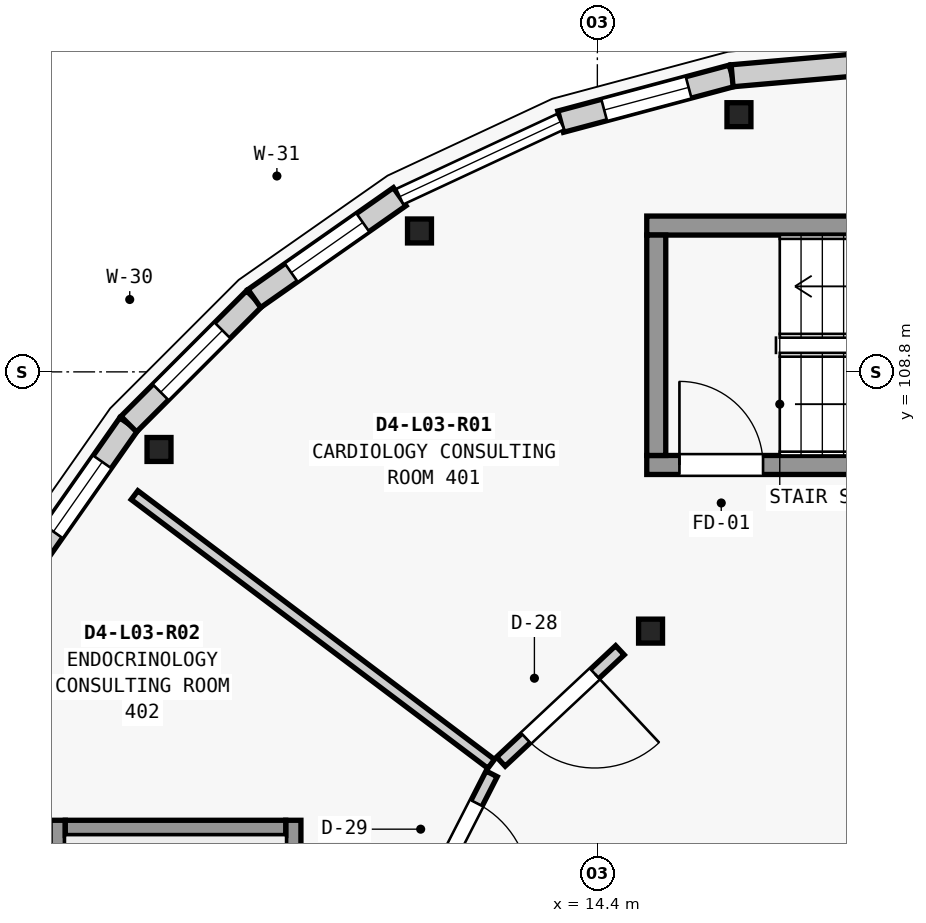
"""IFC4 building model, lengths in metres.
Left out: names, types, materials, properties, quantities, classifications, styles, units other than length and angle.
Written with IfcOpenShell. Run it as: python <this file> out.ifc"""

import sys

from ifc_helpers import new_model, si_unit, direction, frame, frame_2d, origin, origin_2d, place, context, subcontext, project, spatial, rectangle, extrude, element, fill, save


model = new_model("IFC4")
c1 = context("Model", 3, precision=1e-05, world=origin(), true_north=direction((0.0, 1.0)))
c2 = subcontext(c1, "Body", "Model", "MODEL_VIEW")
j1 = project(units=[si_unit("LENGTHUNIT", "METRE"), si_unit("PLANEANGLEUNIT", "RADIAN")], contexts=[c1])
p1 = place(None, origin())
s1 = spatial("IfcSite", under=j1, at=p1, CompositionType="ELEMENT")
p2 = place(p1, origin())
s2 = spatial("IfcBuilding", under=s1, at=p2, CompositionType="ELEMENT")
p3 = place(p2, frame((0.0, 0.0, 12.95)))
s3 = spatial("IfcBuildingStorey", under=s2, at=p3, CompositionType="ELEMENT", Elevation=12.95)
for number, where, z_axis, x_axis in (
    (1, (16.263, 112.184, 0.0), (0.0, 0.0, 1.0), (1.0, 0.0, 0.0)),
    (2, (12.06, 110.654, 0.0), (0.0, 0.0, 1.0), (1.0, 0.0, 0.0)),
    (3, (8.633, 107.779, 0.0), (0.0, 0.0, 1.0), (1.0, 0.0, 0.0)),
    (4, (15.1, 105.389, 0.0), (0.0, 0.0, 1.0), (1.0, 0.0, 0.0)),
):
    element("IfcColumn", number, at=place(p3, frame(where, z_axis=z_axis, x_axis=x_axis)), inside=s3, PredefinedType="COLUMN", context=c2, shape_type="SweptSolid", body=[
        extrude(rectangle(XDim=0.315, YDim=0.315, at=origin_2d()), origin(), (0.0, 0.0, 1.0), 4.2),
    ])
p4 = place(p3, frame((6.895, 106.2, 0.0), z_axis=(0.0, 0.0, 1.0), x_axis=(0.573728883722, 0.819045278347, 0.0)))
e5 = element("IfcWall", 5, at=p4, inside=s3, PredefinedType="ELEMENTEDWALL", context=c2, shape_type="SweptSolid", body=[
    extrude(rectangle(XDim=2.336, YDim=0.29, at=frame_2d((1.168, 0.0))), origin(), (0.0, 0.0, 1.0), 3.349),
])
p5 = place(p4, frame((0.608, 0.0, 0.85)))
e6 = element("IfcOpeningElement", 6, at=p5, cuts=e5, PredefinedType="OPENING", context=c2, shape_type="SweptSolid", body=[
    extrude(rectangle(XDim=1.12, YDim=1.65, at=frame_2d((0.56, 0.825))), frame((0.0, 0.155, 0.0), z_axis=(0.0, -1.0, 0.0), x_axis=(1.0, 0.0, 0.0)), (0.0, 0.0, 1.0), 0.31),
])
p6 = place(p3, frame((8.235, 108.113, 0.0), z_axis=(0.0, 0.0, 1.0), x_axis=(0.707106781187, 0.707106781187, 0.0)))
e7 = element("IfcWall", 7, at=p6, inside=s3, PredefinedType="ELEMENTEDWALL", context=c2, shape_type="SweptSolid", body=[
    extrude(rectangle(XDim=2.336, YDim=0.29, at=frame_2d((1.168, 0.0))), origin(), (0.0, 0.0, 1.0), 3.349),
])
p7 = place(p6, frame((0.593, 0.0, 0.85)))
e8 = element("IfcOpeningElement", 8, at=p7, cuts=e7, PredefinedType="OPENING", context=c2, shape_type="SweptSolid", body=[
    extrude(rectangle(XDim=1.15, YDim=1.4, at=frame_2d((0.575, 0.7))), frame((0.0, 0.155, 0.0), z_axis=(0.0, -1.0, 0.0), x_axis=(1.0, 0.0, 0.0)), (0.0, 0.0, 1.0), 0.31),
])
p8 = place(p3, frame((9.887, 109.765, 0.0), z_axis=(0.0, 0.0, 1.0), x_axis=(0.819045278347, 0.573728883722, 0.0)))
e9 = element("IfcWall", 9, at=p8, inside=s3, PredefinedType="ELEMENTEDWALL", context=c2, shape_type="SweptSolid", body=[
    extrude(rectangle(XDim=2.336, YDim=0.29, at=frame_2d((1.168, 0.0))), origin(), (0.0, 0.0, 1.0), 3.349),
])
p9 = place(p8, frame((0.593, 0.0, 0.85)))
e10 = element("IfcOpeningElement", 10, at=p9, cuts=e9, PredefinedType="OPENING", context=c2, shape_type="SweptSolid", body=[
    extrude(rectangle(XDim=1.15, YDim=1.7, at=frame_2d((0.575, 0.85))), frame((0.0, 0.155, 0.0), z_axis=(0.0, -1.0, 0.0), x_axis=(1.0, 0.0, 0.0)), (0.0, 0.0, 1.0), 0.31),
])
p10 = place(p3, frame((13.917, 112.092, 0.0), z_axis=(0.0, 0.0, 1.0), x_axis=(0.965981166673, 0.258612423585, 0.0)))
e11 = element("IfcWall", 11, at=p10, inside=s3, PredefinedType="ELEMENTEDWALL", context=c2, shape_type="SweptSolid", body=[
    extrude(rectangle(XDim=2.335, YDim=0.29, at=frame_2d((1.168, 0.0))), origin(), (0.0, 0.0, 1.0), 3.349),
])
p11 = place(p10, frame((0.593, 0.0, 0.85)))
e12 = element("IfcOpeningElement", 12, at=p11, cuts=e11, PredefinedType="OPENING", context=c2, shape_type="SweptSolid", body=[
    extrude(rectangle(XDim=1.15, YDim=2.0, at=frame_2d((0.575, 1.0))), frame((0.0, 0.155, 0.0), z_axis=(0.0, -1.0, 0.0), x_axis=(1.0, 0.0, 0.0)), (0.0, 0.0, 1.0), 0.31),
])
p12 = place(p3, frame((16.173, 112.696, 0.0), z_axis=(0.0, 0.0, 1.0), x_axis=(0.996184295282, 0.087274565792, 0.0)))
e13 = element("IfcWall", 13, at=p12, inside=s3, PredefinedType="ELEMENTEDWALL", context=c2, shape_type="SweptSolid", body=[
    extrude(rectangle(XDim=2.336, YDim=0.29, at=frame_2d((1.168, 0.0))), origin(), (0.0, 0.0, 1.0), 3.349),
])
p13 = place(p3, frame((15.05, 107.575, 0.0), z_axis=(0.0, 0.0, 1.0), x_axis=(1.0, 0.0, 0.0)))
e14 = element("IfcWall", 14, at=p13, inside=s3, PredefinedType="SHEAR", context=c2, shape_type="SweptSolid", body=[
    extrude(rectangle(XDim=6.9, YDim=0.25, at=frame_2d((3.45, 0.0))), origin(), (0.0, 0.0, 1.0), 3.995),
])
p14 = place(p13, frame((0.43, 0.0, 0.0)))
e15 = element("IfcOpeningElement", 15, at=p14, cuts=e14, PredefinedType="OPENING", context=c2, shape_type="SweptSolid", body=[
    extrude(rectangle(XDim=1.1, YDim=2.15, at=frame_2d((0.55, 1.075))), frame((0.0, 0.135, 0.0), z_axis=(0.0, -1.0, 0.0), x_axis=(1.0, 0.0, 0.0)), (0.0, 0.0, 1.0), 0.27),
])
p15 = place(p3, frame((15.05, 110.725, 0.0), z_axis=(0.0, 0.0, 1.0), x_axis=(1.0, 0.0, 0.0)))
e16 = element("IfcWall", 16, at=p15, inside=s3, PredefinedType="SHEAR", context=c2, shape_type="SweptSolid", body=[
    extrude(rectangle(XDim=6.9, YDim=0.25, at=frame_2d((3.45, 0.0))), origin(), (0.0, 0.0, 1.0), 3.995),
])
p16 = place(p3, frame((15.175, 107.7, 0.0), z_axis=(0.0, 0.0, 1.0), x_axis=(0.0, 1.0, 0.0)))
e17 = element("IfcWall", 17, at=p16, inside=s3, PredefinedType="SHEAR", context=c2, shape_type="SweptSolid", body=[
    extrude(rectangle(XDim=2.9, YDim=0.25, at=frame_2d((1.45, 0.0))), origin(), (0.0, 0.0, 1.0), 3.995),
])
p17 = place(p3, frame((10.4, 96.1, 0.0), z_axis=(0.0, 0.0, 1.0), x_axis=(0.0, 1.0, 0.0)))
e18 = element("IfcWall", 18, at=p17, inside=s3, PredefinedType="SHEAR", context=c2, shape_type="SweptSolid", body=[
    extrude(rectangle(XDim=6.8, YDim=0.2, at=frame_2d((3.4, 0.0))), origin(), (0.0, 0.0, 1.0), 3.995),
])
p18 = place(p17, frame((0.38, 0.0, 0.0)))
e19 = element("IfcOpeningElement", 19, at=p18, cuts=e18, PredefinedType="OPENING", context=c2, shape_type="SweptSolid", body=[
    extrude(rectangle(XDim=1.05, YDim=2.15, at=frame_2d((0.525, 1.075))), frame((0.0, 0.11, 0.0), z_axis=(0.0, -1.0, 0.0), x_axis=(1.0, 0.0, 0.0)), (0.0, 0.0, 1.0), 0.22),
])
p19 = place(p3, frame((7.3, 96.1, 0.0), z_axis=(0.0, 0.0, 1.0), x_axis=(0.0, 1.0, 0.0)))
e20 = element("IfcWall", 20, at=p19, inside=s3, PredefinedType="SHEAR", context=c2, shape_type="SweptSolid", body=[
    extrude(rectangle(XDim=6.8, YDim=0.2, at=frame_2d((3.4, 0.0))), origin(), (0.0, 0.0, 1.0), 3.995),
])
p20 = place(p3, frame((10.3, 102.8, 0.0), z_axis=(0.0, 0.0, 1.0), x_axis=(-1.0, 0.0, 0.0)))
e21 = element("IfcWall", 21, at=p20, inside=s3, PredefinedType="SHEAR", context=c2, shape_type="SweptSolid", body=[
    extrude(rectangle(XDim=2.9, YDim=0.2, at=frame_2d((1.45, 0.0))), origin(), (0.0, 0.0, 1.0), 3.995),
])
p21 = place(p3, frame((13.003, 103.642, 0.0), z_axis=(0.0, 0.0, 1.0), x_axis=(-0.798611576701, 0.601846782462, 0.0)))
e22 = element("IfcWall", 22, at=p21, inside=s3, PredefinedType="PARTITIONING", context=c2, shape_type="SweptSolid", body=[
    extrude(rectangle(XDim=5.875, YDim=0.145, at=frame_2d((2.938, 0.0))), origin(), (0.0, 0.0, 1.0), 3.324),
])
p22 = place(p3, frame((14.697, 105.137, 0.0), z_axis=(0.0, 0.0, 1.0), x_axis=(-0.73028240744, -0.683145376464, 0.0)))
e23 = element("IfcWall", 23, at=p22, inside=s3, PredefinedType="PARTITIONING", context=c2, shape_type="SweptSolid", body=[
    extrude(rectangle(XDim=2.144, YDim=0.165, at=frame_2d((1.072, 0.0))), origin(), (0.0, 0.0, 1.0), 3.324),
])
p23 = place(p22, frame((0.453, 0.0, 0.0)))
e24 = element("IfcOpeningElement", 24, at=p23, cuts=e23, PredefinedType="OPENING", context=c2, shape_type="SweptSolid", body=[
    extrude(rectangle(XDim=1.24, YDim=2.22, at=frame_2d((0.62, 1.11))), frame((0.0, 0.093, 0.0), z_axis=(0.0, -1.0, 0.0), x_axis=(1.0, 0.0, 0.0)), (0.0, 0.0, 1.0), 0.185),
])
p24 = place(p3, frame((13.009, 103.511, 0.0), z_axis=(0.0, 0.0, 1.0), x_axis=(-0.455072954242, -0.890454157337, 0.0)))
e25 = element("IfcWall", 25, at=p24, inside=s3, PredefinedType="PARTITIONING", context=c2, shape_type="SweptSolid", body=[
    extrude(rectangle(XDim=2.145, YDim=0.165, at=frame_2d((1.072, 0.0))), origin(), (0.0, 0.0, 1.0), 3.324),
])
p25 = place(p24, frame((0.433, 0.0, 0.0)))
e26 = element("IfcOpeningElement", 26, at=p25, cuts=e25, PredefinedType="OPENING", context=c2, shape_type="SweptSolid", body=[
    extrude(rectangle(XDim=1.28, YDim=2.3, at=frame_2d((0.64, 1.15))), frame((0.0, 0.093, 0.0), z_axis=(0.0, -1.0, 0.0), x_axis=(1.0, 0.0, 0.0)), (0.0, 0.0, 1.0), 0.185),
])
p26 = place(p5, origin())
e27 = element("IfcWindow", 27, at=p26, inside=s3, PartitioningType="SINGLE_PANEL", PredefinedType="WINDOW", context=c2, shape_type="SweptSolid", body=[
    extrude(rectangle(XDim=1.12, YDim=1.65, at=frame_2d((0.56, 0.825))), frame((0.0, 0.03, 0.0), z_axis=(0.0, -1.0, 0.0), x_axis=(1.0, 0.0, 0.0)), (0.0, 0.0, 1.0), 0.06),
])
fill(e6, e27)
p27 = place(p7, origin())
e28 = element("IfcWindow", 28, at=p27, inside=s3, PartitioningType="SINGLE_PANEL", PredefinedType="WINDOW", context=c2, shape_type="SweptSolid", body=[
    extrude(rectangle(XDim=1.15, YDim=1.4, at=frame_2d((0.575, 0.7))), frame((0.0, 0.03, 0.0), z_axis=(0.0, -1.0, 0.0), x_axis=(1.0, 0.0, 0.0)), (0.0, 0.0, 1.0), 0.06),
])
fill(e8, e28)
p28 = place(p9, origin())
e29 = element("IfcWindow", 29, at=p28, inside=s3, PartitioningType="SINGLE_PANEL", PredefinedType="WINDOW", context=c2, shape_type="SweptSolid", body=[
    extrude(rectangle(XDim=1.15, YDim=1.7, at=frame_2d((0.575, 0.85))), frame((0.0, 0.03, 0.0), z_axis=(0.0, -1.0, 0.0), x_axis=(1.0, 0.0, 0.0)), (0.0, 0.0, 1.0), 0.06),
])
fill(e10, e29)
p29 = place(p11, origin())
e30 = element("IfcWindow", 30, at=p29, inside=s3, PartitioningType="SINGLE_PANEL", PredefinedType="WINDOW", context=c2, shape_type="SweptSolid", body=[
    extrude(rectangle(XDim=1.15, YDim=2.0, at=frame_2d((0.575, 1.0))), frame((0.0, 0.03, 0.0), z_axis=(0.0, -1.0, 0.0), x_axis=(1.0, 0.0, 0.0)), (0.0, 0.0, 1.0), 0.06),
])
fill(e12, e30)
p30 = place(p14, origin())
e31 = element("IfcDoor", 31, at=p30, inside=s3, OperationType="SINGLE_SWING_LEFT", PredefinedType="DOOR", context=c2, shape_type="SweptSolid", body=[
    extrude(rectangle(XDim=1.1, YDim=2.15, at=frame_2d((0.55, 1.075))), frame((0.0, 0.025, 0.0), z_axis=(0.0, -1.0, 0.0), x_axis=(1.0, 0.0, 0.0)), (0.0, 0.0, 1.0), 0.05),
])
fill(e15, e31)
p31 = place(p23, origin())
e32 = element("IfcDoor", 32, at=p31, inside=s3, OperationType="SINGLE_SWING_LEFT", PredefinedType="DOOR", context=c2, shape_type="SweptSolid", body=[
    extrude(rectangle(XDim=1.24, YDim=2.22, at=frame_2d((0.62, 1.11))), frame((0.0, 0.025, 0.0), z_axis=(0.0, -1.0, 0.0), x_axis=(1.0, 0.0, 0.0)), (0.0, 0.0, 1.0), 0.05),
])
fill(e24, e32)
p32 = place(p25, origin())
e33 = element("IfcDoor", 33, at=p32, inside=s3, OperationType="SINGLE_SWING_RIGHT", PredefinedType="DOOR", context=c2, shape_type="SweptSolid", body=[
    extrude(rectangle(XDim=1.28, YDim=2.3, at=frame_2d((0.64, 1.15))), frame((0.0, 0.025, 0.0), z_axis=(0.0, -1.0, 0.0), x_axis=(1.0, 0.0, 0.0)), (0.0, 0.0, 1.0), 0.05),
])
fill(e26, e33)
save(model, sys.argv[1])
